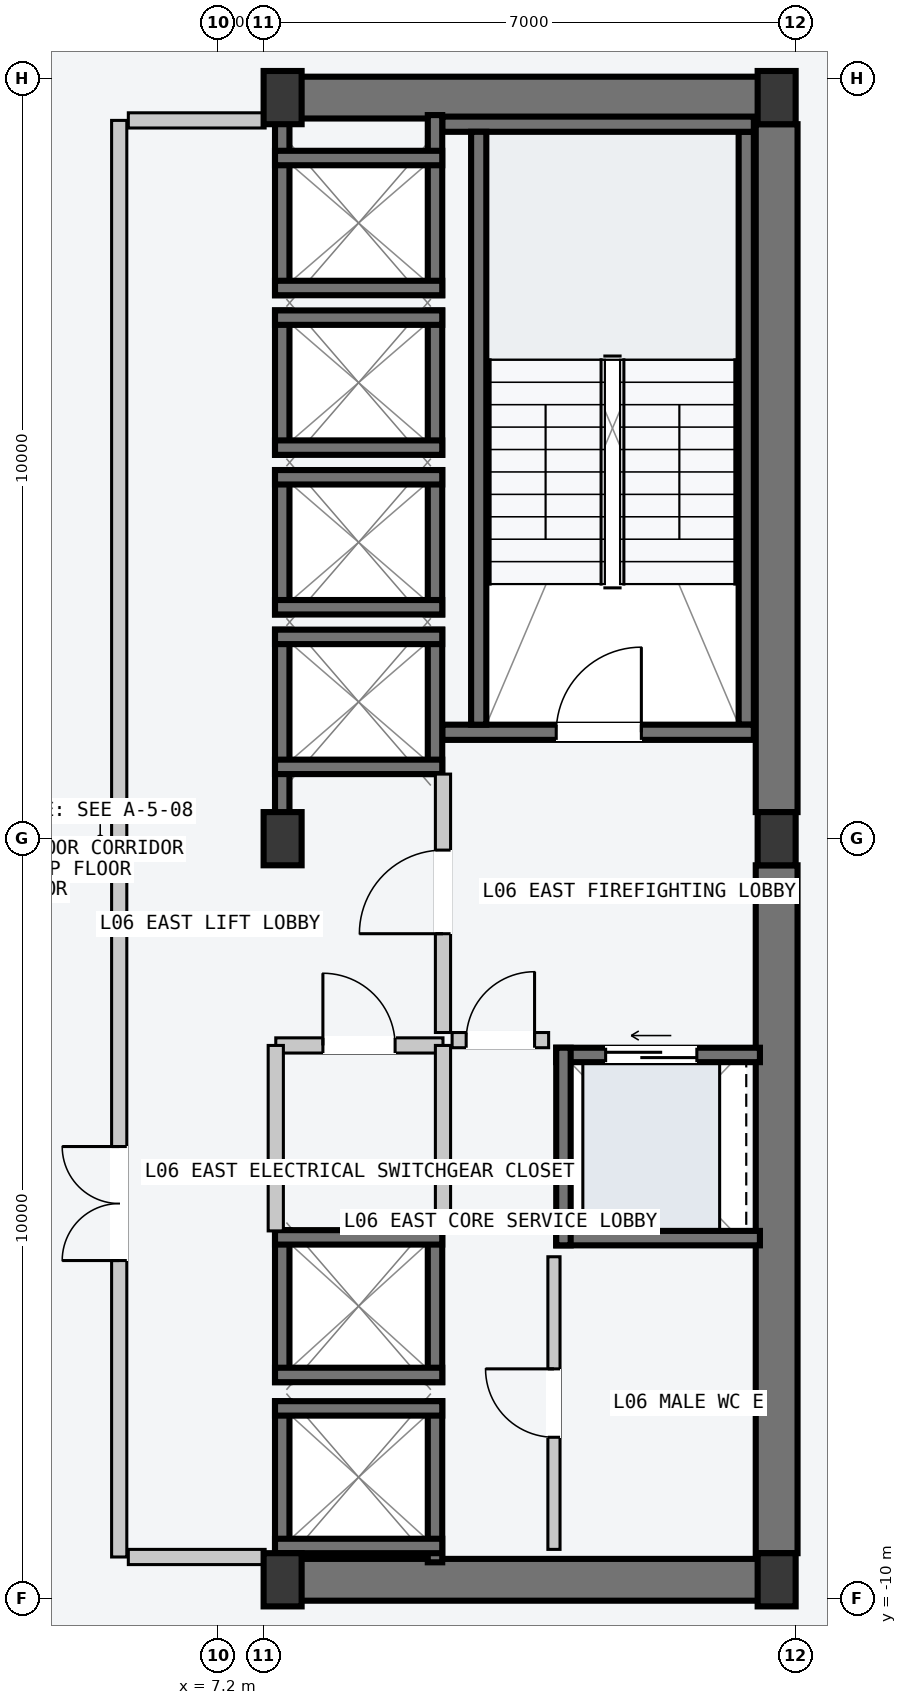
"""IFC4 building model, lengths in metres.
Left out: names, types, materials, properties, quantities, classifications, styles, units other than length and angle.
Written with IfcOpenShell. Run it as: python <this file> out.ifc"""

import sys

from ifc_helpers import new_model, si_unit, direction, frame, frame_2d, origin, origin_2d, place, context, subcontext, project, spatial, rectangle, i_section, extrude, element, fill, save


model = new_model("IFC4")
c1 = context("Model", 3, precision=1e-05, world=origin(), true_north=direction((0.0, 1.0)))
c2 = subcontext(c1, "Body", "Model", "MODEL_VIEW")
j1 = project(units=[si_unit("LENGTHUNIT", "METRE"), si_unit("PLANEANGLEUNIT", "RADIAN")], contexts=[c1])
p1 = place(None, origin())
s1 = spatial("IfcSite", under=j1, at=p1, CompositionType="ELEMENT")
p2 = place(p1, origin())
s2 = spatial("IfcBuilding", under=s1, at=p2, CompositionType="ELEMENT")
p3 = place(p2, frame((0.0, 0.0, 27.6)))
s3 = spatial("IfcBuildingStorey", under=s2, at=p3, CompositionType="ELEMENT", Elevation=27.6)
for number, where, z_axis, x_axis in (
    (1, (8.07, -9.75, -0.2), (0.0, 0.0, 1.0), (1.0, 0.0, 0.0)),
    (2, (8.07, 9.75, -0.2), (0.0, 0.0, 1.0), (1.0, 0.0, 0.0)),
):
    element("IfcWall", number, at=place(p3, frame(where, z_axis=z_axis, x_axis=x_axis)), inside=s3, PredefinedType="SHEAR", context=c2, shape_type="SweptSolid", body=[
        extrude(rectangle(XDim=6.46, YDim=0.55, at=frame_2d((3.23, 0.0))), origin(), (0.0, 0.0, 1.0), 3.6),
    ])
for number, where, z_axis, x_axis in (
    (3, (14.55, -9.4, -0.2), (0.0, 0.0, 1.0), (0.0, 1.0, 0.0)),
    (4, (14.55, 0.35, -0.2), (0.0, 0.0, 1.0), (0.0, 1.0, 0.0)),
):
    element("IfcWall", number, at=place(p3, frame(where, z_axis=z_axis, x_axis=x_axis)), inside=s3, PredefinedType="SHEAR", context=c2, shape_type="SweptSolid", body=[
        extrude(rectangle(XDim=9.05, YDim=0.55, at=frame_2d((4.525, 0.0))), origin(), (0.0, 0.0, 1.0), 3.6),
    ])
p4 = place(p3, frame((14.15, 1.5, -0.2), z_axis=(0.0, 0.0, 1.0), x_axis=(0.0, 1.0, 0.0)))
e5 = element("IfcWall", 5, at=p4, inside=s3, PredefinedType="SOLIDWALL", context=c2, shape_type="SweptSolid", body=[
    extrude(rectangle(XDim=7.8, YDim=0.2, at=frame_2d((3.9, 0.0))), origin(), (0.0, 0.0, 1.0), 3.6),
])
p5 = place(p3, frame((10.15, 1.4, -0.2), z_axis=(0.0, 0.0, 1.0), x_axis=(1.0, 0.0, 0.0)))
e6 = element("IfcWall", 6, at=p5, inside=s3, PredefinedType="SOLIDWALL", context=c2, shape_type="SweptSolid", body=[
    extrude(rectangle(XDim=4.1, YDim=0.2, at=frame_2d((2.05, 0.0))), origin(), (0.0, 0.0, 1.0), 3.6),
])
p6 = place(p5, frame((1.5, 0.0, 0.2)))
e7 = element("IfcOpeningElement", 7, at=p6, cuts=e6, PredefinedType="OPENING", context=c2, shape_type="SweptSolid", body=[
    extrude(rectangle(XDim=1.12, YDim=2.18, at=frame_2d((0.56, 1.09))), frame((0.0, 0.11, 0.0), z_axis=(0.0, -1.0, 0.0), x_axis=(1.0, 0.0, 0.0)), (0.0, 0.0, 1.0), 0.22),
])
p7 = place(p3, frame((10.15, 9.4, -0.2), z_axis=(0.0, 0.0, 1.0), x_axis=(1.0, 0.0, 0.0)))
e8 = element("IfcWall", 8, at=p7, inside=s3, PredefinedType="SOLIDWALL", context=c2, shape_type="SweptSolid", body=[
    extrude(rectangle(XDim=4.1, YDim=0.2, at=frame_2d((2.05, 0.0))), origin(), (0.0, 0.0, 1.0), 3.6),
])
p8 = place(p3, frame((10.63, 1.5, -0.2), z_axis=(0.0, 0.0, 1.0), x_axis=(0.0, 1.0, 0.0)))
e9 = element("IfcWall", 9, at=p8, inside=s3, PredefinedType="SOLIDWALL", context=c2, shape_type="SweptSolid", body=[
    extrude(rectangle(XDim=7.8, YDim=0.2, at=frame_2d((3.9, 0.0))), origin(), (0.0, 0.0, 1.0), 3.6),
])
for number, where, z_axis, x_axis in (
    (10, (8.05, -9.75, 0.0), (0.0, 0.0, 1.0), (1.0, 0.0, 0.0)),
    (11, (8.05, 0.0, 0.0), (0.0, 0.0, 1.0), (1.0, 0.0, 0.0)),
    (12, (8.05, 9.75, 0.0), (0.0, 0.0, 1.0), (1.0, 0.0, 0.0)),
    (13, (14.55, -9.75, 0.0), (0.0, 0.0, 1.0), (1.0, 0.0, 0.0)),
    (14, (14.55, 0.0, 0.0), (0.0, 0.0, 1.0), (1.0, 0.0, 0.0)),
    (15, (14.55, 9.75, 0.0), (0.0, 0.0, 1.0), (1.0, 0.0, 0.0)),
):
    element("IfcColumn", number, at=place(p3, frame(where, z_axis=z_axis, x_axis=x_axis)), inside=s3, PredefinedType="COLUMN", context=c2, shape_type="SweptSolid", body=[
        extrude(i_section(OverallWidth=0.5, OverallDepth=0.7, WebThickness=0.028, FlangeThickness=0.045, at=origin_2d()), origin(), (0.0, 0.0, 1.0), 3.6),
    ])
p9 = place(p3, frame((8.045, 0.21, -0.2), z_axis=(0.0, 0.0, 1.0), x_axis=(0.0, 1.0, 0.0)))
e16 = element("IfcWall", 16, at=p9, inside=s3, PredefinedType="SOLIDWALL", context=c2, shape_type="SweptSolid", body=[
    extrude(rectangle(XDim=2.54, YDim=0.19, at=frame_2d((1.27, 0.0))), origin(), (0.0, 0.0, 1.0), 3.6),
])
p10 = place(p3, frame((10.055, 0.85, -0.2), z_axis=(0.0, 0.0, 1.0), x_axis=(0.0, 1.0, 0.0)))
e17 = element("IfcWall", 17, at=p10, inside=s3, PredefinedType="SOLIDWALL", context=c2, shape_type="SweptSolid", body=[
    extrude(rectangle(XDim=1.9, YDim=0.19, at=frame_2d((0.95, 0.0))), origin(), (0.0, 0.0, 1.0), 3.6),
])
for number, where, z_axis, x_axis in (
    (18, (7.95, 2.655, -0.2), (0.0, 0.0, 1.0), (1.0, 0.0, 0.0)),
    (19, (7.95, 0.945, -0.2), (0.0, 0.0, 1.0), (1.0, 0.0, 0.0)),
):
    element("IfcWall", number, at=place(p3, frame(where, z_axis=z_axis, x_axis=x_axis)), inside=s3, PredefinedType="SOLIDWALL", context=c2, shape_type="SweptSolid", body=[
        extrude(rectangle(XDim=2.2, YDim=0.19, at=frame_2d((1.1, 0.0))), origin(), (0.0, 0.0, 1.0), 3.6),
    ])
for number, where, z_axis, x_axis in (
    (20, (8.045, 2.95, -0.2), (0.0, 0.0, 1.0), (0.0, 1.0, 0.0)),
    (21, (10.055, 2.95, -0.2), (0.0, 0.0, 1.0), (0.0, 1.0, 0.0)),
):
    element("IfcWall", number, at=place(p3, frame(where, z_axis=z_axis, x_axis=x_axis)), inside=s3, PredefinedType="SOLIDWALL", context=c2, shape_type="SweptSolid", body=[
        extrude(rectangle(XDim=1.9, YDim=0.19, at=frame_2d((0.95, 0.0))), origin(), (0.0, 0.0, 1.0), 3.6),
    ])
for number, where, z_axis, x_axis in (
    (22, (7.95, 4.755, -0.2), (0.0, 0.0, 1.0), (1.0, 0.0, 0.0)),
    (23, (7.95, 3.045, -0.2), (0.0, 0.0, 1.0), (1.0, 0.0, 0.0)),
):
    element("IfcWall", number, at=place(p3, frame(where, z_axis=z_axis, x_axis=x_axis)), inside=s3, PredefinedType="SOLIDWALL", context=c2, shape_type="SweptSolid", body=[
        extrude(rectangle(XDim=2.2, YDim=0.19, at=frame_2d((1.1, 0.0))), origin(), (0.0, 0.0, 1.0), 3.6),
    ])
for number, where, z_axis, x_axis in (
    (24, (8.045, 5.05, -0.2), (0.0, 0.0, 1.0), (0.0, 1.0, 0.0)),
    (25, (10.055, 5.05, -0.2), (0.0, 0.0, 1.0), (0.0, 1.0, 0.0)),
):
    element("IfcWall", number, at=place(p3, frame(where, z_axis=z_axis, x_axis=x_axis)), inside=s3, PredefinedType="SOLIDWALL", context=c2, shape_type="SweptSolid", body=[
        extrude(rectangle(XDim=1.9, YDim=0.19, at=frame_2d((0.95, 0.0))), origin(), (0.0, 0.0, 1.0), 3.6),
    ])
for number, where, z_axis, x_axis in (
    (26, (7.95, 6.855, -0.2), (0.0, 0.0, 1.0), (1.0, 0.0, 0.0)),
    (27, (7.95, 5.145, -0.2), (0.0, 0.0, 1.0), (1.0, 0.0, 0.0)),
):
    element("IfcWall", number, at=place(p3, frame(where, z_axis=z_axis, x_axis=x_axis)), inside=s3, PredefinedType="SOLIDWALL", context=c2, shape_type="SweptSolid", body=[
        extrude(rectangle(XDim=2.2, YDim=0.19, at=frame_2d((1.1, 0.0))), origin(), (0.0, 0.0, 1.0), 3.6),
    ])
for number, where, z_axis, x_axis in (
    (28, (8.045, 7.15, -0.2), (0.0, 0.0, 1.0), (0.0, 1.0, 0.0)),
    (29, (10.055, 7.15, -0.2), (0.0, 0.0, 1.0), (0.0, 1.0, 0.0)),
):
    element("IfcWall", number, at=place(p3, frame(where, z_axis=z_axis, x_axis=x_axis)), inside=s3, PredefinedType="SOLIDWALL", context=c2, shape_type="SweptSolid", body=[
        extrude(rectangle(XDim=2.37, YDim=0.19, at=frame_2d((1.185, 0.0))), origin(), (0.0, 0.0, 1.0), 3.6),
    ])
for number, where, z_axis, x_axis in (
    (30, (7.95, 8.955, -0.2), (0.0, 0.0, 1.0), (1.0, 0.0, 0.0)),
    (31, (7.95, 7.245, -0.2), (0.0, 0.0, 1.0), (1.0, 0.0, 0.0)),
):
    element("IfcWall", number, at=place(p3, frame(where, z_axis=z_axis, x_axis=x_axis)), inside=s3, PredefinedType="SOLIDWALL", context=c2, shape_type="SweptSolid", body=[
        extrude(rectangle(XDim=2.2, YDim=0.19, at=frame_2d((1.1, 0.0))), origin(), (0.0, 0.0, 1.0), 3.6),
    ])
for number, where, z_axis, x_axis in (
    (32, (8.045, -9.52, -0.2), (0.0, 0.0, 1.0), (0.0, 1.0, 0.0)),
    (33, (10.055, -9.52, -0.2), (0.0, 0.0, 1.0), (0.0, 1.0, 0.0)),
):
    element("IfcWall", number, at=place(p3, frame(where, z_axis=z_axis, x_axis=x_axis)), inside=s3, PredefinedType="SOLIDWALL", context=c2, shape_type="SweptSolid", body=[
        extrude(rectangle(XDim=2.12, YDim=0.19, at=frame_2d((1.06, 0.0))), origin(), (0.0, 0.0, 1.0), 3.6),
    ])
for number, where, z_axis, x_axis in (
    (34, (7.95, -7.495, -0.2), (0.0, 0.0, 1.0), (1.0, 0.0, 0.0)),
    (35, (7.95, -9.305, -0.2), (0.0, 0.0, 1.0), (1.0, 0.0, 0.0)),
):
    element("IfcWall", number, at=place(p3, frame(where, z_axis=z_axis, x_axis=x_axis)), inside=s3, PredefinedType="SOLIDWALL", context=c2, shape_type="SweptSolid", body=[
        extrude(rectangle(XDim=2.2, YDim=0.19, at=frame_2d((1.1, 0.0))), origin(), (0.0, 0.0, 1.0), 3.6),
    ])
for number, where, z_axis, x_axis in (
    (36, (8.045, -7.15, -0.2), (0.0, 0.0, 1.0), (0.0, 1.0, 0.0)),
    (37, (10.055, -7.15, -0.2), (0.0, 0.0, 1.0), (0.0, 1.0, 0.0)),
):
    element("IfcWall", number, at=place(p3, frame(where, z_axis=z_axis, x_axis=x_axis)), inside=s3, PredefinedType="SOLIDWALL", context=c2, shape_type="SweptSolid", body=[
        extrude(rectangle(XDim=2.0, YDim=0.19, at=frame_2d((1.0, 0.0))), origin(), (0.0, 0.0, 1.0), 3.6),
    ])
for number, where, z_axis, x_axis in (
    (38, (7.95, -5.245, -0.2), (0.0, 0.0, 1.0), (1.0, 0.0, 0.0)),
    (39, (7.95, -7.055, -0.2), (0.0, 0.0, 1.0), (1.0, 0.0, 0.0)),
):
    element("IfcWall", number, at=place(p3, frame(where, z_axis=z_axis, x_axis=x_axis)), inside=s3, PredefinedType="SOLIDWALL", context=c2, shape_type="SweptSolid", body=[
        extrude(rectangle(XDim=2.2, YDim=0.19, at=frame_2d((1.1, 0.0))), origin(), (0.0, 0.0, 1.0), 3.6),
    ])
p11 = place(p3, frame((11.65, -2.845, -0.2), z_axis=(0.0, 0.0, 1.0), x_axis=(1.0, 0.0, 0.0)))
e40 = element("IfcWall", 40, at=p11, inside=s3, PredefinedType="SOLIDWALL", context=c2, shape_type="SweptSolid", body=[
    extrude(rectangle(XDim=2.68, YDim=0.19, at=frame_2d((1.34, 0.0))), origin(), (0.0, 0.0, 1.0), 3.6),
])
p12 = place(p11, frame((0.65, 0.0, 0.2)))
e41 = element("IfcOpeningElement", 41, at=p12, cuts=e40, PredefinedType="OPENING", context=c2, shape_type="SweptSolid", body=[
    extrude(rectangle(XDim=1.2, YDim=2.2, at=frame_2d((0.6, 1.1))), frame((0.0, 0.105, 0.0), z_axis=(0.0, -1.0, 0.0), x_axis=(1.0, 0.0, 0.0)), (0.0, 0.0, 1.0), 0.21),
])
p13 = place(p3, frame((11.65, -5.255, -0.2), z_axis=(0.0, 0.0, 1.0), x_axis=(1.0, 0.0, 0.0)))
e42 = element("IfcWall", 42, at=p13, inside=s3, PredefinedType="SOLIDWALL", context=c2, shape_type="SweptSolid", body=[
    extrude(rectangle(XDim=2.68, YDim=0.19, at=frame_2d((1.34, 0.0))), origin(), (0.0, 0.0, 1.0), 3.6),
])
p14 = place(p3, frame((11.745, -5.35, -0.2), z_axis=(0.0, 0.0, 1.0), x_axis=(0.0, 1.0, 0.0)))
e43 = element("IfcWall", 43, at=p14, inside=s3, PredefinedType="SOLIDWALL", context=c2, shape_type="SweptSolid", body=[
    extrude(rectangle(XDim=2.6, YDim=0.19, at=frame_2d((1.3, 0.0))), origin(), (0.0, 0.0, 1.0), 3.6),
])
p15 = place(p3, frame((5.9, -9.45, 0.0), z_axis=(0.0, 0.0, 1.0), x_axis=(0.0, 1.0, 0.0)))
e44 = element("IfcWall", 44, at=p15, inside=s3, PredefinedType="PARTITIONING", context=c2, shape_type="SweptSolid", body=[
    extrude(rectangle(XDim=18.9, YDim=0.2, at=frame_2d((9.45, 0.0))), origin(), (0.0, 0.0, 1.0), 3.4),
])
p16 = place(p15, frame((3.9, 0.0, 0.0)))
e45 = element("IfcOpeningElement", 45, at=p16, cuts=e44, PredefinedType="OPENING", context=c2, shape_type="SweptSolid", body=[
    extrude(rectangle(XDim=1.5, YDim=2.2, at=frame_2d((0.75, 1.1))), frame((0.0, 0.11, 0.0), z_axis=(0.0, -1.0, 0.0), x_axis=(1.0, 0.0, 0.0)), (0.0, 0.0, 1.0), 0.22),
])
for number, where, z_axis, x_axis in (
    (46, (6.02, -9.45, 0.0), (0.0, 0.0, 1.0), (1.0, 0.0, 0.0)),
    (47, (6.02, 9.45, 0.0), (0.0, 0.0, 1.0), (1.0, 0.0, 0.0)),
):
    element("IfcWall", number, at=place(p3, frame(where, z_axis=z_axis, x_axis=x_axis)), inside=s3, PredefinedType="PARTITIONING", context=c2, shape_type="SweptSolid", body=[
        extrude(rectangle(XDim=1.8, YDim=0.2, at=frame_2d((0.9, 0.0))), origin(), (0.0, 0.0, 1.0), 3.4),
    ])
p17 = place(p3, frame((10.16, -2.55, 0.0), z_axis=(0.0, 0.0, 1.0), x_axis=(0.0, 1.0, 0.0)))
e48 = element("IfcWall", 48, at=p17, inside=s3, PredefinedType="PARTITIONING", context=c2, shape_type="SweptSolid", body=[
    extrude(rectangle(XDim=3.4, YDim=0.2, at=frame_2d((1.7, 0.0))), origin(), (0.0, 0.0, 1.0), 3.4),
])
p18 = place(p17, frame((1.3, 0.0, 0.0)))
e49 = element("IfcOpeningElement", 49, at=p18, cuts=e48, PredefinedType="OPENING", context=c2, shape_type="SweptSolid", body=[
    extrude(rectangle(XDim=1.1, YDim=2.15, at=frame_2d((0.55, 1.075))), frame((0.0, 0.11, 0.0), z_axis=(0.0, -1.0, 0.0), x_axis=(1.0, 0.0, 0.0)), (0.0, 0.0, 1.0), 0.22),
])
p19 = place(p3, frame((10.28, -2.65, 0.0), z_axis=(0.0, 0.0, 1.0), x_axis=(1.0, 0.0, 0.0)))
e50 = element("IfcWall", 50, at=p19, inside=s3, PredefinedType="PARTITIONING", context=c2, shape_type="SweptSolid", body=[
    extrude(rectangle(XDim=1.27, YDim=0.2, at=frame_2d((0.635, 0.0))), origin(), (0.0, 0.0, 1.0), 3.4),
])
p20 = place(p19, frame((0.185, 0.0, 0.0)))
e51 = element("IfcOpeningElement", 51, at=p20, cuts=e50, PredefinedType="OPENING", context=c2, shape_type="SweptSolid", body=[
    extrude(rectangle(XDim=0.9, YDim=2.15, at=frame_2d((0.45, 1.075))), frame((0.0, 0.11, 0.0), z_axis=(0.0, -1.0, 0.0), x_axis=(1.0, 0.0, 0.0)), (0.0, 0.0, 1.0), 0.22),
])
p21 = place(p3, frame((7.96, -2.72, 0.0), z_axis=(0.0, 0.0, 1.0), x_axis=(1.0, 0.0, 0.0)))
e52 = element("IfcWall", 52, at=p21, inside=s3, PredefinedType="PARTITIONING", context=c2, shape_type="SweptSolid", body=[
    extrude(rectangle(XDim=2.2, YDim=0.2, at=frame_2d((1.1, 0.0))), origin(), (0.0, 0.0, 1.0), 3.4),
])
p22 = place(p21, frame((0.62, 0.0, 0.0)))
e53 = element("IfcOpeningElement", 53, at=p22, cuts=e52, PredefinedType="OPENING", context=c2, shape_type="SweptSolid", body=[
    extrude(rectangle(XDim=0.95, YDim=2.1, at=frame_2d((0.475, 1.05))), frame((0.0, 0.11, 0.0), z_axis=(0.0, -1.0, 0.0), x_axis=(1.0, 0.0, 0.0)), (0.0, 0.0, 1.0), 0.22),
])
for number, where, z_axis, x_axis in (
    (54, (7.96, -5.16, 0.0), (0.0, 0.0, 1.0), (0.0, 1.0, 0.0)),
    (55, (10.16, -5.16, 0.0), (0.0, 0.0, 1.0), (0.0, 1.0, 0.0)),
):
    element("IfcWall", number, at=place(p3, frame(where, z_axis=z_axis, x_axis=x_axis)), inside=s3, PredefinedType="PARTITIONING", context=c2, shape_type="SweptSolid", body=[
        extrude(rectangle(XDim=2.44, YDim=0.2, at=frame_2d((1.22, 0.0))), origin(), (0.0, 0.0, 1.0), 3.4),
    ])
p23 = place(p3, frame((11.62, -9.35, 0.0), z_axis=(0.0, 0.0, 1.0), x_axis=(0.0, 1.0, 0.0)))
e56 = element("IfcWall", 56, at=p23, inside=s3, PredefinedType="PARTITIONING", context=c2, shape_type="SweptSolid", body=[
    extrude(rectangle(XDim=3.85, YDim=0.16, at=frame_2d((1.925, 0.0))), origin(), (0.0, 0.0, 1.0), 3.4),
])
p24 = place(p23, frame((1.475, 0.0, 0.0)))
e57 = element("IfcOpeningElement", 57, at=p24, cuts=e56, PredefinedType="OPENING", context=c2, shape_type="SweptSolid", body=[
    extrude(rectangle(XDim=0.9, YDim=2.15, at=frame_2d((0.45, 1.075))), frame((0.0, 0.09, 0.0), z_axis=(0.0, -1.0, 0.0), x_axis=(1.0, 0.0, 0.0)), (0.0, 0.0, 1.0), 0.18),
])
p25 = place(p6, origin())
e58 = element("IfcDoor", 58, at=p25, inside=s3, OperationType="SINGLE_SWING_RIGHT", PredefinedType="DOOR", context=c2, shape_type="SweptSolid", body=[
    extrude(rectangle(XDim=1.12, YDim=2.18, at=frame_2d((0.56, 1.09))), frame((0.0, 0.025, 0.0), z_axis=(0.0, -1.0, 0.0), x_axis=(1.0, 0.0, 0.0)), (0.0, 0.0, 1.0), 0.05),
])
fill(e7, e58)
p26 = place(p12, origin())
e59 = element("IfcDoor", 59, at=p26, inside=s3, OperationType="SLIDING_TO_LEFT", PredefinedType="DOOR", context=c2, shape_type="SweptSolid", body=[
    extrude(rectangle(XDim=1.2, YDim=2.2, at=frame_2d((0.6, 1.1))), frame((0.0, 0.025, 0.0), z_axis=(0.0, -1.0, 0.0), x_axis=(1.0, 0.0, 0.0)), (0.0, 0.0, 1.0), 0.05),
])
fill(e41, e59)
p27 = place(p16, origin())
e60 = element("IfcDoor", 60, at=p27, inside=s3, OperationType="DOUBLE_DOOR_SINGLE_SWING", PredefinedType="DOOR", context=c2, shape_type="SweptSolid", body=[
    extrude(rectangle(XDim=1.5, YDim=2.2, at=frame_2d((0.75, 1.1))), frame((0.0, 0.025, 0.0), z_axis=(0.0, -1.0, 0.0), x_axis=(1.0, 0.0, 0.0)), (0.0, 0.0, 1.0), 0.05),
])
fill(e45, e60)
p28 = place(p18, origin())
e61 = element("IfcDoor", 61, at=p28, inside=s3, OperationType="SINGLE_SWING_LEFT", PredefinedType="DOOR", context=c2, shape_type="SweptSolid", body=[
    extrude(rectangle(XDim=1.1, YDim=2.15, at=frame_2d((0.55, 1.075))), frame((0.0, 0.025, 0.0), z_axis=(0.0, -1.0, 0.0), x_axis=(1.0, 0.0, 0.0)), (0.0, 0.0, 1.0), 0.05),
])
fill(e49, e61)
p29 = place(p20, origin())
e62 = element("IfcDoor", 62, at=p29, inside=s3, OperationType="SINGLE_SWING_RIGHT", PredefinedType="DOOR", context=c2, shape_type="SweptSolid", body=[
    extrude(rectangle(XDim=0.9, YDim=2.15, at=frame_2d((0.45, 1.075))), frame((0.0, 0.025, 0.0), z_axis=(0.0, -1.0, 0.0), x_axis=(1.0, 0.0, 0.0)), (0.0, 0.0, 1.0), 0.05),
])
fill(e51, e62)
p30 = place(p22, origin())
e63 = element("IfcDoor", 63, at=p30, inside=s3, OperationType="SINGLE_SWING_LEFT", PredefinedType="DOOR", context=c2, shape_type="SweptSolid", body=[
    extrude(rectangle(XDim=0.95, YDim=2.1, at=frame_2d((0.475, 1.05))), frame((0.0, 0.025, 0.0), z_axis=(0.0, -1.0, 0.0), x_axis=(1.0, 0.0, 0.0)), (0.0, 0.0, 1.0), 0.05),
])
fill(e53, e63)
p31 = place(p24, origin())
e64 = element("IfcDoor", 64, at=p31, inside=s3, OperationType="SINGLE_SWING_RIGHT", PredefinedType="DOOR", context=c2, shape_type="SweptSolid", body=[
    extrude(rectangle(XDim=0.9, YDim=2.15, at=frame_2d((0.45, 1.075))), frame((0.0, 0.025, 0.0), z_axis=(0.0, -1.0, 0.0), x_axis=(1.0, 0.0, 0.0)), (0.0, 0.0, 1.0), 0.05),
])
fill(e57, e64)
save(model, sys.argv[1])
